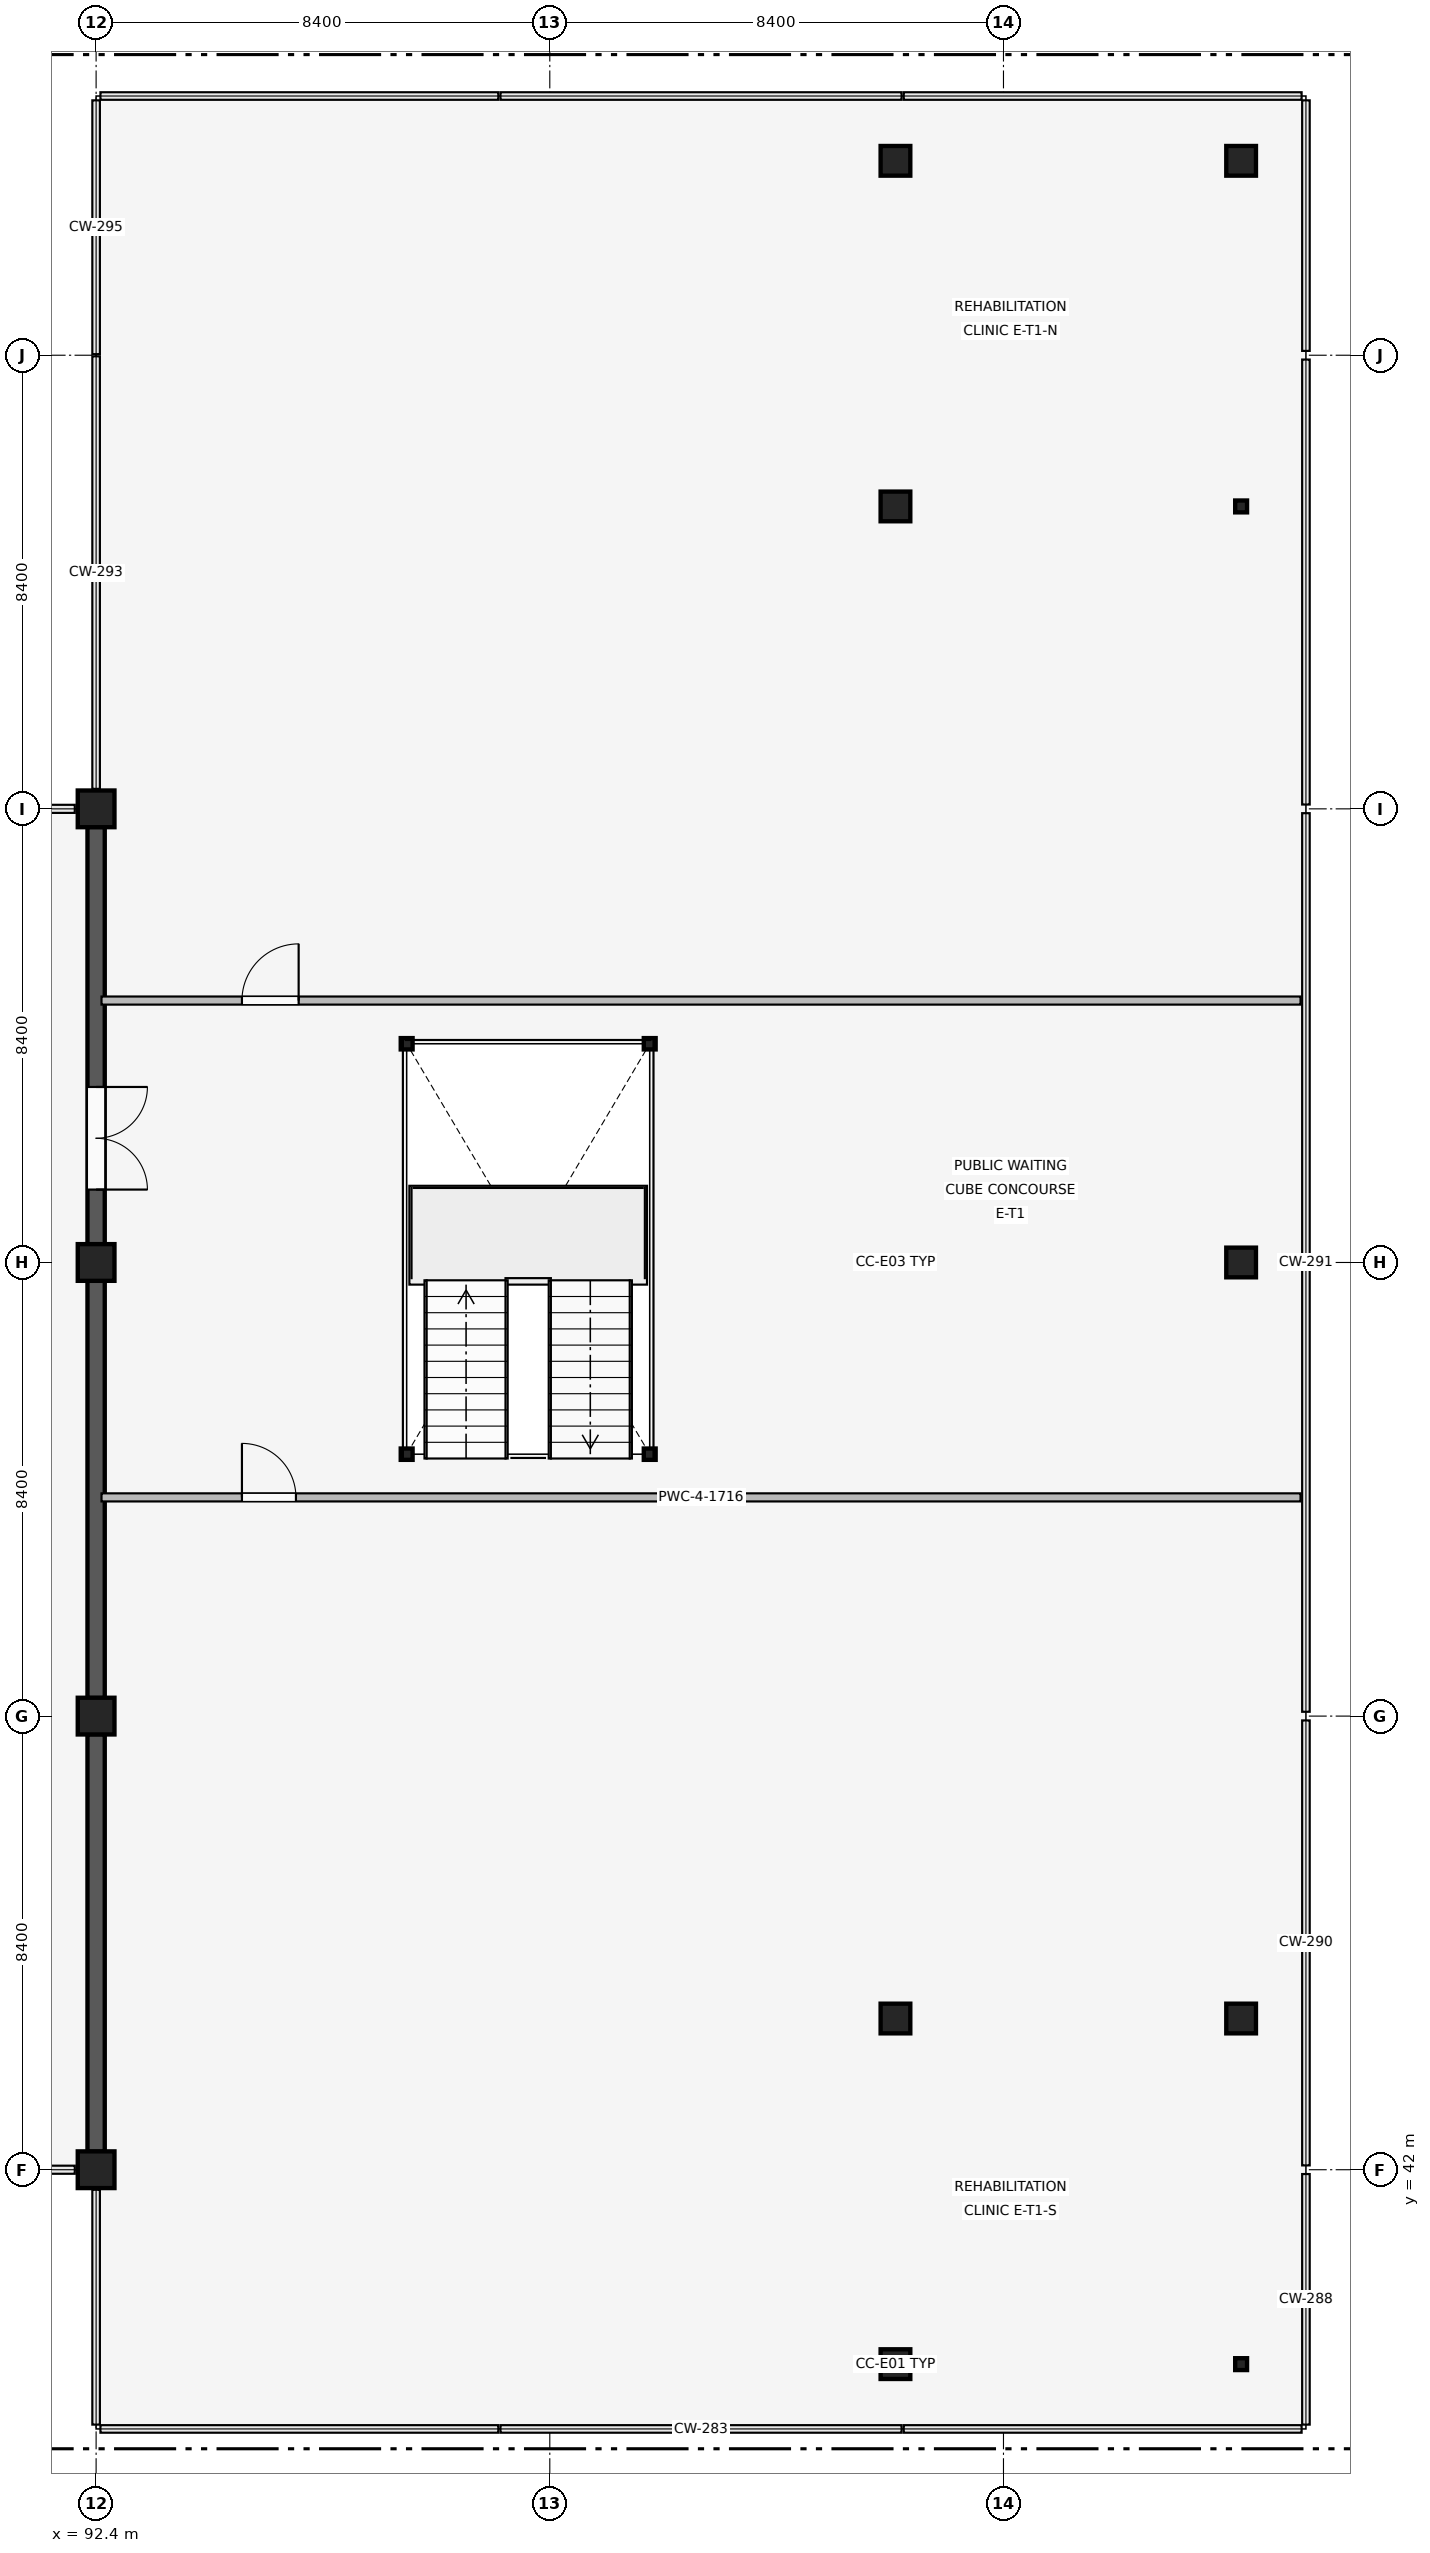
"""IFC4 building model, lengths in metres.
Left out: names, types, materials, properties, quantities, classifications, styles, units other than length and angle.
Written with IfcOpenShell. Run it as: python <this file> out.ifc"""

import sys

from ifc_helpers import new_model, si_unit, direction, frame, frame_2d, origin, origin_2d, place, context, subcontext, project, spatial, rectangle, i_section, extrude, element, fill, save


model = new_model("IFC4")
c1 = context("Model", 3, precision=1e-05, world=origin(), true_north=direction((0.0, 1.0)))
c2 = subcontext(c1, "Body", "Model", "MODEL_VIEW")
j1 = project(units=[si_unit("LENGTHUNIT", "METRE"), si_unit("PLANEANGLEUNIT", "RADIAN")], contexts=[c1])
p1 = place(None, origin())
s1 = spatial("IfcSite", under=j1, at=p1, CompositionType="ELEMENT")
p2 = place(p1, origin())
s2 = spatial("IfcBuilding", under=s1, at=p2, CompositionType="ELEMENT")
p3 = place(p2, frame((0.0, 0.0, 16.2)))
s3 = spatial("IfcBuildingStorey", under=s2, at=p3, CompositionType="ELEMENT", Elevation=16.2)
for number, where, z_axis, x_axis in (
    (1, (92.4, 42.0, 0.0), (0.0, 0.0, 1.0), (1.0, 0.0, 0.0)),
    (2, (92.4, 50.4, 0.0), (0.0, 0.0, 1.0), (1.0, 0.0, 0.0)),
    (3, (92.4, 58.8, 0.0), (0.0, 0.0, 1.0), (1.0, 0.0, 0.0)),
    (4, (92.4, 67.2, 0.0), (0.0, 0.0, 1.0), (1.0, 0.0, 0.0)),
):
    element("IfcColumn", number, at=place(p3, frame(where, z_axis=z_axis, x_axis=x_axis)), inside=s3, PredefinedType="COLUMN", context=c2, shape_type="SweptSolid", body=[
        extrude(rectangle(XDim=0.68, YDim=0.68, at=origin_2d()), origin(), (0.0, 0.0, 1.0), 4.2),
    ])
for number, where, z_axis, x_axis in (
    (5, (107.2, 38.4, 0.0), (0.0, 0.0, 1.0), (1.0, 0.0, 0.0)),
    (6, (107.2, 44.8, 0.0), (0.0, 0.0, 1.0), (1.0, 0.0, 0.0)),
):
    element("IfcColumn", number, at=place(p3, frame(where, z_axis=z_axis, x_axis=x_axis)), inside=s3, PredefinedType="COLUMN", context=c2, shape_type="SweptSolid", body=[
        extrude(rectangle(XDim=0.55, YDim=0.55, at=origin_2d()), origin(), (0.0, 0.0, 1.0), 4.2),
    ])
p4 = place(p3, frame((107.2, 58.8, 0.0), z_axis=(0.0, 0.0, 1.0), x_axis=(1.0, 0.0, 0.0)))
e7 = element("IfcColumn", 7, at=p4, inside=s3, PredefinedType="COLUMN", context=c2, shape_type="SweptSolid", body=[
    extrude(i_section(OverallWidth=0.22, OverallDepth=0.22, WebThickness=0.01, FlangeThickness=0.016, at=origin_2d()), origin(), (0.0, 0.0, 1.0), 4.2),
])
for number, where, z_axis, x_axis in (
    (8, (107.2, 72.8, 0.0), (0.0, 0.0, 1.0), (1.0, 0.0, 0.0)),
    (9, (107.2, 79.2, 0.0), (0.0, 0.0, 1.0), (1.0, 0.0, 0.0)),
):
    element("IfcColumn", number, at=place(p3, frame(where, z_axis=z_axis, x_axis=x_axis)), inside=s3, PredefinedType="COLUMN", context=c2, shape_type="SweptSolid", body=[
        extrude(rectangle(XDim=0.55, YDim=0.55, at=origin_2d()), origin(), (0.0, 0.0, 1.0), 4.2),
    ])
p5 = place(p3, frame((113.6, 38.4, 0.0), z_axis=(0.0, 0.0, 1.0), x_axis=(1.0, 0.0, 0.0)))
e10 = element("IfcColumn", 10, at=p5, inside=s3, PredefinedType="COLUMN", context=c2, shape_type="SweptSolid", body=[
    extrude(i_section(OverallWidth=0.22, OverallDepth=0.22, WebThickness=0.01, FlangeThickness=0.016, at=origin_2d()), origin(), (0.0, 0.0, 1.0), 4.2),
])
for number, where, z_axis, x_axis in (
    (11, (113.6, 44.8, 0.0), (0.0, 0.0, 1.0), (1.0, 0.0, 0.0)),
    (12, (113.6, 58.8, 0.0), (0.0, 0.0, 1.0), (1.0, 0.0, 0.0)),
):
    element("IfcColumn", number, at=place(p3, frame(where, z_axis=z_axis, x_axis=x_axis)), inside=s3, PredefinedType="COLUMN", context=c2, shape_type="SweptSolid", body=[
        extrude(rectangle(XDim=0.55, YDim=0.55, at=origin_2d()), origin(), (0.0, 0.0, 1.0), 4.2),
    ])
p6 = place(p3, frame((113.6, 72.8, 0.0), z_axis=(0.0, 0.0, 1.0), x_axis=(1.0, 0.0, 0.0)))
e13 = element("IfcColumn", 13, at=p6, inside=s3, PredefinedType="COLUMN", context=c2, shape_type="SweptSolid", body=[
    extrude(i_section(OverallWidth=0.22, OverallDepth=0.22, WebThickness=0.01, FlangeThickness=0.016, at=origin_2d()), origin(), (0.0, 0.0, 1.0), 4.2),
])
p7 = place(p3, frame((113.6, 79.2, 0.0), z_axis=(0.0, 0.0, 1.0), x_axis=(1.0, 0.0, 0.0)))
e14 = element("IfcColumn", 14, at=p7, inside=s3, PredefinedType="COLUMN", context=c2, shape_type="SweptSolid", body=[
    extrude(rectangle(XDim=0.55, YDim=0.55, at=origin_2d()), origin(), (0.0, 0.0, 1.0), 4.2),
])
for number, where, z_axis, x_axis in (
    (15, (98.15, 55.25, 0.0), (0.0, 0.0, 1.0), (1.0, 0.0, 0.0)),
    (16, (102.65, 55.25, 0.0), (0.0, 0.0, 1.0), (1.0, 0.0, 0.0)),
    (17, (98.15, 62.85, 0.0), (0.0, 0.0, 1.0), (1.0, 0.0, 0.0)),
    (18, (102.65, 62.85, 0.0), (0.0, 0.0, 1.0), (1.0, 0.0, 0.0)),
):
    element("IfcColumn", number, at=place(p3, frame(where, z_axis=z_axis, x_axis=x_axis)), inside=s3, PredefinedType="COLUMN", context=c2, shape_type="SweptSolid", body=[
        extrude(i_section(OverallWidth=0.22, OverallDepth=0.21, WebThickness=0.007, FlangeThickness=0.011, at=origin_2d()), origin(), (0.0, 0.0, 1.0), 4.2),
    ])
for number, where, z_axis, x_axis in (
    (19, (92.4, 50.065, 0.0), (0.0, 0.0, 1.0), (0.0, -1.0, 0.0)),
    (20, (92.4, 58.465, 0.0), (0.0, 0.0, 1.0), (0.0, -1.0, 0.0)),
):
    element("IfcWall", number, at=place(p3, frame(where, z_axis=z_axis, x_axis=x_axis)), inside=s3, PredefinedType="SOLIDWALL", context=c2, shape_type="SweptSolid", body=[
        extrude(rectangle(XDim=7.73, YDim=0.32, at=frame_2d((3.865, 0.0))), origin(), (0.0, 0.0, 1.0), 3.32),
    ])
p8 = place(p3, frame((92.4, 66.865, 0.0), z_axis=(0.0, 0.0, 1.0), x_axis=(0.0, -1.0, 0.0)))
e21 = element("IfcWall", 21, at=p8, inside=s3, PredefinedType="SOLIDWALL", context=c2, shape_type="SweptSolid", body=[
    extrude(rectangle(XDim=7.73, YDim=0.32, at=frame_2d((3.865, 0.0))), origin(), (0.0, 0.0, 1.0), 3.32),
])
p9 = place(p8, frame((4.815, 0.0, 0.0)))
e22 = element("IfcOpeningElement", 22, at=p9, cuts=e21, PredefinedType="OPENING", context=c2, shape_type="SweptSolid", body=[
    extrude(rectangle(XDim=1.9, YDim=2.4, at=frame_2d((0.95, 1.2))), frame((0.0, 0.17, 0.0), z_axis=(0.0, -1.0, 0.0), x_axis=(1.0, 0.0, 0.0)), (0.0, 0.0, 1.0), 0.34),
])
p10 = place(p3, frame((92.5, 54.45, 0.0), z_axis=(0.0, 0.0, 1.0), x_axis=(1.0, 0.0, 0.0)))
e23 = element("IfcWall", 23, at=p10, inside=s3, PredefinedType="PARTITIONING", context=c2, shape_type="SweptSolid", body=[
    extrude(rectangle(XDim=22.2, YDim=0.15, at=frame_2d((11.1, 0.0))), origin(), (0.0, 0.0, 1.0), 3.49),
])
p11 = place(p10, frame((2.6, 0.0, 0.0)))
e24 = element("IfcOpeningElement", 24, at=p11, cuts=e23, PredefinedType="OPENING", context=c2, shape_type="SweptSolid", body=[
    extrude(rectangle(XDim=1.0, YDim=2.15, at=frame_2d((0.5, 1.075))), frame((0.0, 0.085, 0.0), z_axis=(0.0, -1.0, 0.0), x_axis=(1.0, 0.0, 0.0)), (0.0, 0.0, 1.0), 0.17),
])
p12 = place(p3, frame((92.5, 63.65, 0.0), z_axis=(0.0, 0.0, 1.0), x_axis=(1.0, 0.0, 0.0)))
e25 = element("IfcWall", 25, at=p12, inside=s3, PredefinedType="PARTITIONING", context=c2, shape_type="SweptSolid", body=[
    extrude(rectangle(XDim=22.2, YDim=0.15, at=frame_2d((11.1, 0.0))), origin(), (0.0, 0.0, 1.0), 3.49),
])
p13 = place(p12, frame((2.6, 0.0, 0.0)))
e26 = element("IfcOpeningElement", 26, at=p13, cuts=e25, PredefinedType="OPENING", context=c2, shape_type="SweptSolid", body=[
    extrude(rectangle(XDim=1.05, YDim=2.2, at=frame_2d((0.525, 1.1))), frame((0.0, 0.085, 0.0), z_axis=(0.0, -1.0, 0.0), x_axis=(1.0, 0.0, 0.0)), (0.0, 0.0, 1.0), 0.17),
])
p14 = place(p9, origin())
e27 = element("IfcDoor", 27, at=p14, inside=s3, OperationType="DOUBLE_SWING_LEFT", PredefinedType="DOOR", context=c2, shape_type="SweptSolid", body=[
    extrude(rectangle(XDim=1.9, YDim=2.4, at=frame_2d((0.95, 1.2))), frame((0.0, 0.025, 0.0), z_axis=(0.0, -1.0, 0.0), x_axis=(1.0, 0.0, 0.0)), (0.0, 0.0, 1.0), 0.05),
])
fill(e22, e27)
p15 = place(p11, origin())
e28 = element("IfcDoor", 28, at=p15, inside=s3, OperationType="SINGLE_SWING_LEFT", PredefinedType="DOOR", context=c2, shape_type="SweptSolid", body=[
    extrude(rectangle(XDim=1.0, YDim=2.15, at=frame_2d((0.5, 1.075))), frame((0.0, 0.025, 0.0), z_axis=(0.0, -1.0, 0.0), x_axis=(1.0, 0.0, 0.0)), (0.0, 0.0, 1.0), 0.05),
])
fill(e24, e28)
p16 = place(p13, origin())
e29 = element("IfcDoor", 29, at=p16, inside=s3, OperationType="SINGLE_SWING_RIGHT", PredefinedType="DOOR", context=c2, shape_type="SweptSolid", body=[
    extrude(rectangle(XDim=1.05, YDim=2.2, at=frame_2d((0.525, 1.1))), frame((0.0, 0.025, 0.0), z_axis=(0.0, -1.0, 0.0), x_axis=(1.0, 0.0, 0.0)), (0.0, 0.0, 1.0), 0.05),
])
fill(e26, e29)
save(model, sys.argv[1])
